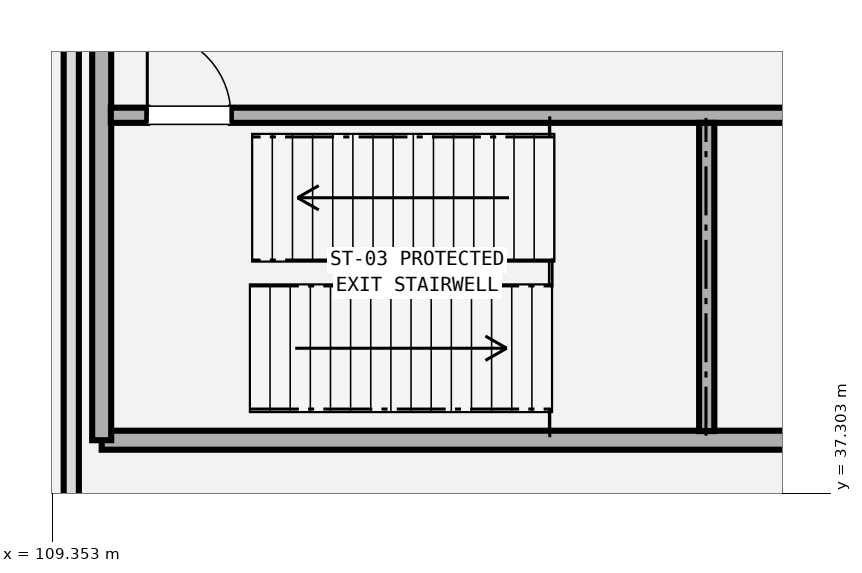
"""IFC4 building model, lengths in metres.
Left out: names, types, materials, properties, quantities, classifications, styles, units other than length and angle.
Written with IfcOpenShell. Run it as: python <this file> out.ifc"""

import sys

from ifc_helpers import new_model, si_unit, direction, frame, frame_2d, origin, place, context, subcontext, project, spatial, rectangle, extrude, element, fill, save


model = new_model("IFC4")
c1 = context("Model", 3, precision=1e-05, world=origin(), true_north=direction((0.0, 1.0)))
c2 = subcontext(c1, "Body", "Model", "MODEL_VIEW")
j1 = project(units=[si_unit("LENGTHUNIT", "METRE"), si_unit("PLANEANGLEUNIT", "RADIAN")], contexts=[c1])
p1 = place(None, origin())
s1 = spatial("IfcSite", under=j1, at=p1, CompositionType="ELEMENT")
p2 = place(p1, origin())
s2 = spatial("IfcBuilding", under=s1, at=p2, CompositionType="ELEMENT")
p3 = place(p2, frame((0.0, 0.0, -5.4)))
s3 = spatial("IfcBuildingStorey", under=s2, at=p3, CompositionType="ELEMENT", Elevation=-5.4)
p4 = place(p3, frame((110.0, 38.0, -0.15), z_axis=(0.0, 0.0, 1.0), x_axis=(1.0, 0.0, 0.0)))
e1 = element("IfcWall", 1, at=p4, inside=s3, PredefinedType="SHEAR", context=c2, shape_type="SweptSolid", body=[
    extrude(rectangle(XDim=10.8, YDim=0.25, at=frame_2d((5.4, 0.0))), origin(), (0.0, 0.0, 1.0), 5.13),
])
p5 = place(p3, frame((110.0, 38.0, -0.15), z_axis=(0.0, 0.0, 1.0), x_axis=(0.0, 1.0, 0.0)))
e2 = element("IfcWall", 2, at=p5, inside=s3, PredefinedType="SHEAR", context=c2, shape_type="SweptSolid", body=[
    extrude(rectangle(XDim=8.6, YDim=0.25, at=frame_2d((4.3, 0.0))), origin(), (0.0, 0.0, 1.0), 5.13),
])
p6 = place(p3, frame((110.12, 42.275, -0.15), z_axis=(0.0, 0.0, 1.0), x_axis=(1.0, 0.0, 0.0)))
e3 = element("IfcWall", 3, at=p6, inside=s3, PredefinedType="SHEAR", context=c2, shape_type="SweptSolid", body=[
    extrude(rectangle(XDim=10.56, YDim=0.2, at=frame_2d((5.28, 0.0))), origin(), (0.0, 0.0, 1.0), 5.13),
])
p7 = place(p6, frame((0.48, 0.0, 0.15)))
e4 = element("IfcOpeningElement", 4, at=p7, cuts=e3, PredefinedType="OPENING", context=c2, shape_type="SweptSolid", body=[
    extrude(rectangle(XDim=1.1, YDim=2.2, at=frame_2d((0.55, 1.1))), frame((0.0, 0.11, 0.0), z_axis=(0.0, -1.0, 0.0), x_axis=(1.0, 0.0, 0.0)), (0.0, 0.0, 1.0), 0.22),
])
p8 = place(p3, frame((117.96, 38.12, -0.15), z_axis=(0.0, 0.0, 1.0), x_axis=(0.0, 1.0, 0.0)))
e5 = element("IfcWall", 5, at=p8, inside=s3, PredefinedType="SHEAR", context=c2, shape_type="SweptSolid", body=[
    extrude(rectangle(XDim=4.055, YDim=0.2, at=frame_2d((2.027, 0.0))), origin(), (0.0, 0.0, 1.0), 5.13),
])
p9 = place(p3, frame((109.6, 29.8, 0.0), z_axis=(0.0, 0.0, 1.0), x_axis=(0.0, 1.0, 0.0)))
e6 = element("IfcWall", 6, at=p9, inside=s3, PredefinedType="SOLIDWALL", context=c2, shape_type="SweptSolid", body=[
    extrude(rectangle(XDim=16.8, YDim=0.2, at=frame_2d((8.4, 0.0))), origin(), (0.0, 0.0, 1.0), 3.8),
])
p10 = place(p7, origin())
e7 = element("IfcDoor", 7, at=p10, inside=s3, OperationType="SINGLE_SWING_LEFT", PredefinedType="DOOR", context=c2, shape_type="SweptSolid", body=[
    extrude(rectangle(XDim=1.1, YDim=2.2, at=frame_2d((0.55, 1.1))), frame((0.0, 0.025, 0.0), z_axis=(0.0, -1.0, 0.0), x_axis=(1.0, 0.0, 0.0)), (0.0, 0.0, 1.0), 0.05),
])
fill(e4, e7)
save(model, sys.argv[1])
